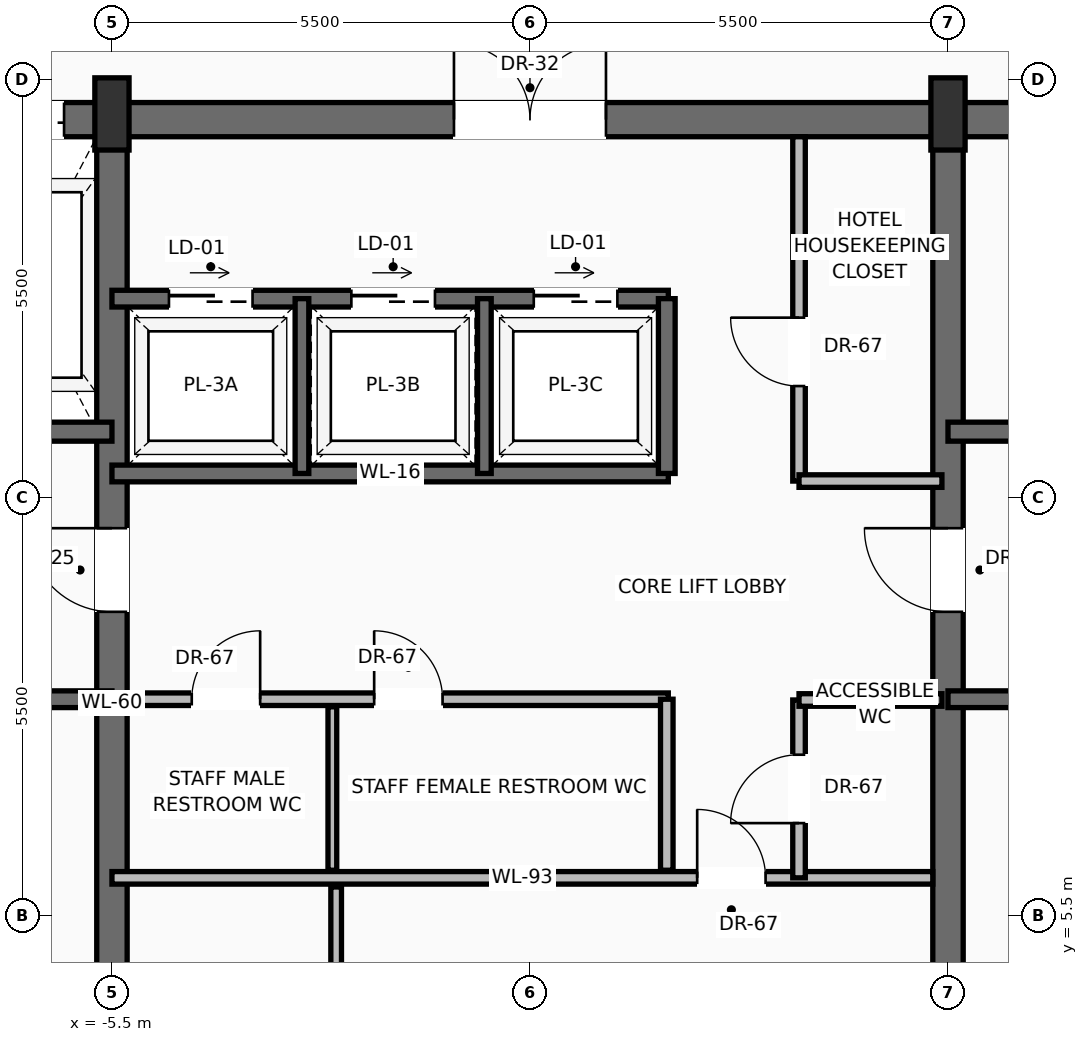
"""IFC4 building model, lengths in metres.
Left out: names, types, materials, properties, quantities, classifications, styles, units other than length and angle.
Written with IfcOpenShell. Run it as: python <this file> out.ifc"""

import sys

from ifc_helpers import new_model, si_unit, direction, frame, frame_2d, origin, origin_2d, place, context, subcontext, project, spatial, rectangle, extrude, source, transform, mapped, element, fill, save


model = new_model("IFC4")
c1 = context("Model", 3, precision=1e-05, world=origin(), true_north=direction((0.0, 1.0)))
c2 = subcontext(c1, "Body", "Model", "MODEL_VIEW")
j1 = project(units=[si_unit("LENGTHUNIT", "METRE"), si_unit("PLANEANGLEUNIT", "RADIAN")], contexts=[c1])
p1 = place(None, origin())
s1 = spatial("IfcSite", under=j1, at=p1, CompositionType="ELEMENT")
p2 = place(p1, origin())
s2 = spatial("IfcBuilding", under=s1, at=p2, CompositionType="ELEMENT")
p3 = place(p2, frame((0.0, 0.0, 262.65)))
s3 = spatial("IfcBuildingStorey", under=s2, at=p3, CompositionType="ELEMENT", Elevation=262.65)
p4 = place(p3, frame((-10.6, 15.975, 0.0), z_axis=(0.0, 0.0, 1.0), x_axis=(1.0, 0.0, 0.0)))
e1 = element("IfcWall", 1, at=p4, inside=s3, PredefinedType="SHEAR", context=c2, shape_type="SweptSolid", body=[
    extrude(rectangle(XDim=21.2, YDim=0.45, at=frame_2d((10.6, 0.0))), origin(), (0.0, 0.0, 1.0), 3.24),
])
p5 = place(p4, frame((3.17, 0.0, 0.0)))
e2 = element("IfcOpeningElement", 2, at=p5, cuts=e1, PredefinedType="OPENING", context=c2, shape_type="SweptSolid", body=[
    extrude(rectangle(XDim=1.3, YDim=2.3, at=frame_2d((0.65, 1.15))), frame((0.0, 0.235, 0.0), z_axis=(0.0, -1.0, 0.0), x_axis=(1.0, 0.0, 0.0)), (0.0, 0.0, 1.0), 0.47),
])
p6 = place(p4, frame((9.6, 0.0, 0.0)))
e3 = element("IfcOpeningElement", 3, at=p6, cuts=e1, PredefinedType="OPENING", context=c2, shape_type="SweptSolid", body=[
    extrude(rectangle(XDim=2.0, YDim=2.4, at=frame_2d((1.0, 1.2))), frame((0.0, 0.235, 0.0), z_axis=(0.0, -1.0, 0.0), x_axis=(1.0, 0.0, 0.0)), (0.0, 0.0, 1.0), 0.47),
])
p7 = place(p3, frame((-5.5, 0.625, 0.0), z_axis=(0.0, 0.0, 1.0), x_axis=(0.0, 1.0, 0.0)))
e4 = element("IfcWall", 4, at=p7, inside=s3, PredefinedType="SHEAR", context=c2, shape_type="SweptSolid", body=[
    extrude(rectangle(XDim=15.35, YDim=0.4, at=frame_2d((7.675, 0.0))), origin(), (0.0, 0.0, 1.0), 3.24),
])
p8 = place(p7, frame((8.875, 0.0, 0.0)))
e5 = element("IfcOpeningElement", 5, at=p8, cuts=e4, PredefinedType="OPENING", context=c2, shape_type="SweptSolid", body=[
    extrude(rectangle(XDim=1.1, YDim=2.2, at=frame_2d((0.55, 1.1))), frame((0.0, 0.21, 0.0), z_axis=(0.0, -1.0, 0.0), x_axis=(1.0, 0.0, 0.0)), (0.0, 0.0, 1.0), 0.42),
])
p9 = place(p3, frame((5.5, 0.625, 0.0), z_axis=(0.0, 0.0, 1.0), x_axis=(0.0, 1.0, 0.0)))
e6 = element("IfcWall", 6, at=p9, inside=s3, PredefinedType="SHEAR", context=c2, shape_type="SweptSolid", body=[
    extrude(rectangle(XDim=15.35, YDim=0.4, at=frame_2d((7.675, 0.0))), origin(), (0.0, 0.0, 1.0), 3.24),
])
p10 = place(p9, frame((8.875, 0.0, 0.0)))
e7 = element("IfcOpeningElement", 7, at=p10, cuts=e6, PredefinedType="OPENING", context=c2, shape_type="SweptSolid", body=[
    extrude(rectangle(XDim=1.1, YDim=2.2, at=frame_2d((0.55, 1.1))), frame((0.0, 0.21, 0.0), z_axis=(0.0, -1.0, 0.0), x_axis=(1.0, 0.0, 0.0)), (0.0, 0.0, 1.0), 0.42),
])
m1 = source(origin(), c2, "Body", "SweptSolid", [
    extrude(rectangle(XDim=0.45, YDim=0.95, at=origin_2d()), origin(), (0.0, 0.0, 1.0), 3.45),
])
for number, where, z_axis, x_axis in (
    (8, (-5.5, 16.05, 0.0), (0.0, 0.0, 1.0), (1.0, 0.0, 0.0)),
    (9, (5.5, 16.05, 0.0), (0.0, 0.0, 1.0), (1.0, 0.0, 0.0)),
):
    element("IfcColumn", number, at=place(p3, frame(where, z_axis=z_axis, x_axis=x_axis)), inside=s3, PredefinedType="PILASTER", context=c2, shape_type="MappedRepresentation", body=[
        mapped(m1, transform((0.0, 0.0, 0.0), scale=1.0)),
    ])
p11 = place(p3, frame((-5.5, 8.35, 0.0), z_axis=(0.0, 0.0, 1.0), x_axis=(-1.0, 0.0, 0.0)))
e10 = element("IfcWall", 10, at=p11, inside=s3, PredefinedType="SOLIDWALL", context=c2, shape_type="SweptSolid", body=[
    extrude(rectangle(XDim=4.65, YDim=0.22, at=frame_2d((2.325, 0.0))), origin(), (0.0, 0.0, 1.0), 3.24),
])
p12 = place(p11, frame((2.5, 0.0, 0.0)))
e11 = element("IfcOpeningElement", 11, at=p12, cuts=e10, PredefinedType="OPENING", context=c2, shape_type="SweptSolid", body=[
    extrude(rectangle(XDim=1.15, YDim=2.2, at=frame_2d((0.575, 1.1))), frame((0.0, 0.12, 0.0), z_axis=(0.0, -1.0, 0.0), x_axis=(1.0, 0.0, 0.0)), (0.0, 0.0, 1.0), 0.24),
])
p13 = place(p3, frame((-5.5, 11.87, 0.0), z_axis=(0.0, 0.0, 1.0), x_axis=(-1.0, 0.0, 0.0)))
e12 = element("IfcWall", 12, at=p13, inside=s3, PredefinedType="SOLIDWALL", context=c2, shape_type="SweptSolid", body=[
    extrude(rectangle(XDim=4.65, YDim=0.25, at=frame_2d((2.325, 0.0))), origin(), (0.0, 0.0, 1.0), 3.24),
])
p14 = place(p13, frame((2.95, 0.0, 0.0)))
e13 = element("IfcOpeningElement", 13, at=p14, cuts=e12, PredefinedType="OPENING", context=c2, shape_type="SweptSolid", body=[
    extrude(rectangle(XDim=1.2, YDim=2.25, at=frame_2d((0.6, 1.125))), frame((0.0, 0.135, 0.0), z_axis=(0.0, -1.0, 0.0), x_axis=(1.0, 0.0, 0.0)), (0.0, 0.0, 1.0), 0.27),
])
p15 = place(p3, frame((10.15, 8.35, 0.0), z_axis=(0.0, 0.0, 1.0), x_axis=(-1.0, 0.0, 0.0)))
e14 = element("IfcWall", 14, at=p15, inside=s3, PredefinedType="SOLIDWALL", context=c2, shape_type="SweptSolid", body=[
    extrude(rectangle(XDim=4.65, YDim=0.22, at=frame_2d((2.325, 0.0))), origin(), (0.0, 0.0, 1.0), 3.24),
])
p16 = place(p15, frame((1.0, 0.0, 0.0)))
e15 = element("IfcOpeningElement", 15, at=p16, cuts=e14, PredefinedType="OPENING", context=c2, shape_type="SweptSolid", body=[
    extrude(rectangle(XDim=1.15, YDim=2.2, at=frame_2d((0.575, 1.1))), frame((0.0, 0.12, 0.0), z_axis=(0.0, -1.0, 0.0), x_axis=(1.0, 0.0, 0.0)), (0.0, 0.0, 1.0), 0.24),
])
p17 = place(p3, frame((10.15, 11.87, 0.0), z_axis=(0.0, 0.0, 1.0), x_axis=(-1.0, 0.0, 0.0)))
e16 = element("IfcWall", 16, at=p17, inside=s3, PredefinedType="SOLIDWALL", context=c2, shape_type="SweptSolid", body=[
    extrude(rectangle(XDim=4.65, YDim=0.25, at=frame_2d((2.325, 0.0))), origin(), (0.0, 0.0, 1.0), 3.24),
])
p18 = place(p17, frame((0.5, 0.0, 0.0)))
e17 = element("IfcOpeningElement", 17, at=p18, cuts=e16, PredefinedType="OPENING", context=c2, shape_type="SweptSolid", body=[
    extrude(rectangle(XDim=1.2, YDim=2.25, at=frame_2d((0.6, 1.125))), frame((0.0, 0.135, 0.0), z_axis=(0.0, -1.0, 0.0), x_axis=(1.0, 0.0, 0.0)), (0.0, 0.0, 1.0), 0.27),
])
p19 = place(p3, frame((-5.5, 6.0, 0.0), z_axis=(0.0, 0.0, 1.0), x_axis=(1.0, 0.0, 0.0)))
e18 = element("IfcWall", 18, at=p19, inside=s3, PredefinedType="PARTITIONING", context=c2, shape_type="SweptSolid", body=[
    extrude(rectangle(XDim=10.8, YDim=0.165, at=frame_2d((5.4, 0.0))), origin(), (0.0, 0.0, 1.0), 3.232),
])
p20 = place(p19, frame((7.7, 0.0, 0.0)))
e19 = element("IfcOpeningElement", 19, at=p20, cuts=e18, PredefinedType="OPENING", context=c2, shape_type="SweptSolid", body=[
    extrude(rectangle(XDim=0.9, YDim=2.1, at=frame_2d((0.45, 1.05))), frame((0.0, 0.093, 0.0), z_axis=(0.0, -1.0, 0.0), x_axis=(1.0, 0.0, 0.0)), (0.0, 0.0, 1.0), 0.185),
])
p21 = place(p3, frame((-2.55, 0.85, 0.0), z_axis=(0.0, 0.0, 1.0), x_axis=(0.0, 1.0, 0.0)))
e20 = element("IfcWall", 20, at=p21, inside=s3, PredefinedType="PARTITIONING", context=c2, shape_type="SweptSolid", body=[
    extrude(rectangle(XDim=5.03, YDim=0.14, at=frame_2d((2.515, 0.0))), origin(), (0.0, 0.0, 1.0), 3.232),
])
p22 = place(p21, frame((2.1, 0.0, 0.0)))
e21 = element("IfcOpeningElement", 21, at=p22, cuts=e20, PredefinedType="OPENING", context=c2, shape_type="SweptSolid", body=[
    extrude(rectangle(XDim=0.9, YDim=2.1, at=frame_2d((0.45, 1.05))), frame((0.0, 0.08, 0.0), z_axis=(0.0, -1.0, 0.0), x_axis=(1.0, 0.0, 0.0)), (0.0, 0.0, 1.0), 0.16),
])
p23 = place(p3, frame((3.54, 6.0, 0.0), z_axis=(0.0, 0.0, 1.0), x_axis=(0.0, 1.0, 0.0)))
e22 = element("IfcWall", 22, at=p23, inside=s3, PredefinedType="PARTITIONING", context=c2, shape_type="SweptSolid", body=[
    extrude(rectangle(XDim=2.34, YDim=0.165, at=frame_2d((1.17, 0.0))), origin(), (0.0, 0.0, 1.0), 3.232),
])
p24 = place(p23, frame((0.72, 0.0, 0.0)))
e23 = element("IfcOpeningElement", 23, at=p24, cuts=e22, PredefinedType="OPENING", context=c2, shape_type="SweptSolid", body=[
    extrude(rectangle(XDim=0.9, YDim=2.1, at=frame_2d((0.45, 1.05))), frame((0.0, 0.093, 0.0), z_axis=(0.0, -1.0, 0.0), x_axis=(1.0, 0.0, 0.0)), (0.0, 0.0, 1.0), 0.185),
])
p25 = place(p3, frame((3.54, 8.34, 0.0), z_axis=(0.0, 0.0, 1.0), x_axis=(1.0, 0.0, 0.0)))
e24 = element("IfcWall", 24, at=p25, inside=s3, PredefinedType="PARTITIONING", context=c2, shape_type="SweptSolid", body=[
    extrude(rectangle(XDim=1.88, YDim=0.165, at=frame_2d((0.94, 0.0))), origin(), (0.0, 0.0, 1.0), 3.232),
])
p26 = place(p3, frame((-5.3, 8.35, 0.0), z_axis=(0.0, 0.0, 1.0), x_axis=(1.0, 0.0, 0.0)))
e25 = element("IfcWall", 25, at=p26, inside=s3, PredefinedType="PARTITIONING", context=c2, shape_type="SweptSolid", body=[
    extrude(rectangle(XDim=7.12, YDim=0.165, at=frame_2d((3.56, 0.0))), origin(), (0.0, 0.0, 1.0), 3.232),
])
p27 = place(p26, frame((0.85, 0.0, 0.0)))
e26 = element("IfcOpeningElement", 26, at=p27, cuts=e25, PredefinedType="OPENING", context=c2, shape_type="SweptSolid", body=[
    extrude(rectangle(XDim=0.9, YDim=2.1, at=frame_2d((0.45, 1.05))), frame((0.0, 0.093, 0.0), z_axis=(0.0, -1.0, 0.0), x_axis=(1.0, 0.0, 0.0)), (0.0, 0.0, 1.0), 0.185),
])
p28 = place(p26, frame((3.25, 0.0, 0.0)))
e27 = element("IfcOpeningElement", 27, at=p28, cuts=e25, PredefinedType="OPENING", context=c2, shape_type="SweptSolid", body=[
    extrude(rectangle(XDim=0.9, YDim=2.1, at=frame_2d((0.45, 1.05))), frame((0.0, 0.093, 0.0), z_axis=(0.0, -1.0, 0.0), x_axis=(1.0, 0.0, 0.0)), (0.0, 0.0, 1.0), 0.185),
])
p29 = place(p3, frame((1.8, 6.1, 0.0), z_axis=(0.0, 0.0, 1.0), x_axis=(0.0, 1.0, 0.0)))
e28 = element("IfcWall", 28, at=p29, inside=s3, PredefinedType="PARTITIONING", context=c2, shape_type="SweptSolid", body=[
    extrude(rectangle(XDim=2.25, YDim=0.165, at=frame_2d((1.125, 0.0))), origin(), (0.0, 0.0, 1.0), 3.232),
])
p30 = place(p3, frame((-2.6, 6.1, 0.0), z_axis=(0.0, 0.0, 1.0), x_axis=(0.0, 1.0, 0.0)))
e29 = element("IfcWall", 29, at=p30, inside=s3, PredefinedType="PARTITIONING", context=c2, shape_type="SweptSolid", body=[
    extrude(rectangle(XDim=2.15, YDim=0.115, at=frame_2d((1.075, 0.0))), origin(), (0.0, 0.0, 1.0), 3.232),
])
p31 = place(p3, frame((-5.5, 11.32, 0.0), z_axis=(0.0, 0.0, 1.0), x_axis=(1.0, 0.0, 0.0)))
e30 = element("IfcWall", 30, at=p31, inside=s3, PredefinedType="SOLIDWALL", context=c2, shape_type="SweptSolid", body=[
    extrude(rectangle(XDim=7.32, YDim=0.22, at=frame_2d((3.66, 0.0))), origin(), (0.0, 0.0, 1.0), 3.24),
])
p32 = place(p3, frame((-5.5, 13.62, 0.0), z_axis=(0.0, 0.0, 1.0), x_axis=(1.0, 0.0, 0.0)))
e31 = element("IfcWall", 31, at=p32, inside=s3, PredefinedType="SOLIDWALL", context=c2, shape_type="SweptSolid", body=[
    extrude(rectangle(XDim=7.32, YDim=0.22, at=frame_2d((3.66, 0.0))), origin(), (0.0, 0.0, 1.0), 3.24),
])
p33 = place(p32, frame((0.75, 0.0, 0.0)))
e32 = element("IfcOpeningElement", 32, at=p33, cuts=e31, PredefinedType="OPENING", context=c2, shape_type="SweptSolid", body=[
    extrude(rectangle(XDim=1.1, YDim=2.2, at=frame_2d((0.55, 1.1))), frame((0.0, 0.12, 0.0), z_axis=(0.0, -1.0, 0.0), x_axis=(1.0, 0.0, 0.0)), (0.0, 0.0, 1.0), 0.24),
])
p34 = place(p32, frame((3.15, 0.0, 0.0)))
e33 = element("IfcOpeningElement", 33, at=p34, cuts=e31, PredefinedType="OPENING", context=c2, shape_type="SweptSolid", body=[
    extrude(rectangle(XDim=1.1, YDim=2.2, at=frame_2d((0.55, 1.1))), frame((0.0, 0.12, 0.0), z_axis=(0.0, -1.0, 0.0), x_axis=(1.0, 0.0, 0.0)), (0.0, 0.0, 1.0), 0.24),
])
p35 = place(p32, frame((5.55, 0.0, 0.0)))
e34 = element("IfcOpeningElement", 34, at=p35, cuts=e31, PredefinedType="OPENING", context=c2, shape_type="SweptSolid", body=[
    extrude(rectangle(XDim=1.1, YDim=2.2, at=frame_2d((0.55, 1.1))), frame((0.0, 0.12, 0.0), z_axis=(0.0, -1.0, 0.0), x_axis=(1.0, 0.0, 0.0)), (0.0, 0.0, 1.0), 0.24),
])
p36 = place(p3, frame((1.8, 11.32, 0.0), z_axis=(0.0, 0.0, 1.0), x_axis=(0.0, 1.0, 0.0)))
e35 = element("IfcWall", 35, at=p36, inside=s3, PredefinedType="SOLIDWALL", context=c2, shape_type="SweptSolid", body=[
    extrude(rectangle(XDim=2.3, YDim=0.22, at=frame_2d((1.15, 0.0))), origin(), (0.0, 0.0, 1.0), 3.24),
])
for number, where, z_axis, x_axis in (
    (36, (-3.0, 11.32, 0.0), (0.0, 0.0, 1.0), (0.0, 1.0, 0.0)),
    (37, (-0.6, 11.32, 0.0), (0.0, 0.0, 1.0), (0.0, 1.0, 0.0)),
):
    element("IfcWall", number, at=place(p3, frame(where, z_axis=z_axis, x_axis=x_axis)), inside=s3, PredefinedType="SOLIDWALL", context=c2, shape_type="SweptSolid", body=[
        extrude(rectangle(XDim=2.3, YDim=0.18, at=frame_2d((1.15, 0.0))), origin(), (0.0, 0.0, 1.0), 3.24),
    ])
p37 = place(p3, frame((3.54, 11.22, 0.0), z_axis=(0.0, 0.0, 1.0), x_axis=(0.0, 1.0, 0.0)))
e38 = element("IfcWall", 38, at=p37, inside=s3, PredefinedType="PARTITIONING", context=c2, shape_type="SweptSolid", body=[
    extrude(rectangle(XDim=4.53, YDim=0.165, at=frame_2d((2.265, 0.0))), origin(), (0.0, 0.0, 1.0), 3.232),
])
p38 = place(p37, frame((1.25, 0.0, 0.0)))
e39 = element("IfcOpeningElement", 39, at=p38, cuts=e38, PredefinedType="OPENING", context=c2, shape_type="SweptSolid", body=[
    extrude(rectangle(XDim=0.9, YDim=2.1, at=frame_2d((0.45, 1.05))), frame((0.0, 0.093, 0.0), z_axis=(0.0, -1.0, 0.0), x_axis=(1.0, 0.0, 0.0)), (0.0, 0.0, 1.0), 0.185),
])
p39 = place(p3, frame((3.54, 11.22, 0.0), z_axis=(0.0, 0.0, 1.0), x_axis=(1.0, 0.0, 0.0)))
e40 = element("IfcWall", 40, at=p39, inside=s3, PredefinedType="PARTITIONING", context=c2, shape_type="SweptSolid", body=[
    extrude(rectangle(XDim=1.88, YDim=0.165, at=frame_2d((0.94, 0.0))), origin(), (0.0, 0.0, 1.0), 3.232),
])
m2 = source(origin(), c2, "Body", "SweptSolid", [
    extrude(rectangle(XDim=1.1, YDim=2.2, at=frame_2d((0.55, 1.1))), frame((0.0, 0.025, 0.0), z_axis=(0.0, -1.0, 0.0), x_axis=(1.0, 0.0, 0.0)), (0.0, 0.0, 1.0), 0.05),
])
p40 = place(p8, origin())
e41 = element("IfcDoor", 41, at=p40, inside=s3, OperationType="SINGLE_SWING_RIGHT", PredefinedType="DOOR", context=c2, shape_type="MappedRepresentation", body=[
    mapped(m2, transform((0.0, 0.0, 0.0), scale=1.0)),
])
fill(e5, e41)
m3 = source(origin(), c2, "Body", "SweptSolid", [
    extrude(rectangle(XDim=1.3, YDim=2.3, at=frame_2d((0.65, 1.15))), frame((0.0, 0.025, 0.0), z_axis=(0.0, -1.0, 0.0), x_axis=(1.0, 0.0, 0.0)), (0.0, 0.0, 1.0), 0.05),
])
p41 = place(p5, origin())
e42 = element("IfcDoor", 42, at=p41, inside=s3, OperationType="SLIDING_TO_RIGHT", PredefinedType="DOOR", context=c2, shape_type="MappedRepresentation", body=[
    mapped(m3, transform((0.0, 0.0, 0.0), scale=1.0)),
])
fill(e2, e42)
p42 = place(p10, origin())
e43 = element("IfcDoor", 43, at=p42, inside=s3, OperationType="SINGLE_SWING_RIGHT", PredefinedType="DOOR", context=c2, shape_type="MappedRepresentation", body=[
    mapped(m2, transform((0.0, 0.0, 0.0), scale=1.0)),
])
fill(e7, e43)
m4 = source(origin(), c2, "Body", "SweptSolid", [
    extrude(rectangle(XDim=2.0, YDim=2.4, at=frame_2d((1.0, 1.2))), frame((0.0, 0.025, 0.0), z_axis=(0.0, -1.0, 0.0), x_axis=(1.0, 0.0, 0.0)), (0.0, 0.0, 1.0), 0.05),
])
p43 = place(p6, origin())
e44 = element("IfcDoor", 44, at=p43, inside=s3, OperationType="DOUBLE_DOOR_SINGLE_SWING", PredefinedType="DOOR", context=c2, shape_type="MappedRepresentation", body=[
    mapped(m4, transform((0.0, 0.0, 0.0), scale=1.0)),
])
fill(e3, e44)
m5 = source(origin(), c2, "Body", "SweptSolid", [
    extrude(rectangle(XDim=0.9, YDim=2.1, at=frame_2d((0.45, 1.05))), frame((0.0, 0.025, 0.0), z_axis=(0.0, -1.0, 0.0), x_axis=(1.0, 0.0, 0.0)), (0.0, 0.0, 1.0), 0.05),
])
p44 = place(p20, origin())
e45 = element("IfcDoor", 45, at=p44, inside=s3, OperationType="SINGLE_SWING_LEFT", PredefinedType="DOOR", context=c2, shape_type="MappedRepresentation", body=[
    mapped(m5, transform((0.0, 0.0, 0.0), scale=1.0)),
])
fill(e19, e45)
p45 = place(p24, origin())
e46 = element("IfcDoor", 46, at=p45, inside=s3, OperationType="SINGLE_SWING_LEFT", PredefinedType="DOOR", context=c2, shape_type="MappedRepresentation", body=[
    mapped(m5, transform((0.0, 0.0, 0.0), scale=1.0)),
])
fill(e23, e46)
p46 = place(p27, origin())
e47 = element("IfcDoor", 47, at=p46, inside=s3, OperationType="SINGLE_SWING_RIGHT", PredefinedType="DOOR", context=c2, shape_type="MappedRepresentation", body=[
    mapped(m5, transform((0.0, 0.0, 0.0), scale=1.0)),
])
fill(e26, e47)
p47 = place(p28, origin())
e48 = element("IfcDoor", 48, at=p47, inside=s3, OperationType="SINGLE_SWING_LEFT", PredefinedType="DOOR", context=c2, shape_type="MappedRepresentation", body=[
    mapped(m5, transform((0.0, 0.0, 0.0), scale=1.0)),
])
fill(e27, e48)
m6 = source(origin(), c2, "Body", "SweptSolid", [
    extrude(rectangle(XDim=1.1, YDim=2.2, at=frame_2d((0.55, 1.1))), frame((0.0, 0.025, 0.0), z_axis=(0.0, -1.0, 0.0), x_axis=(1.0, 0.0, 0.0)), (0.0, 0.0, 1.0), 0.05),
])
p48 = place(p33, origin())
e49 = element("IfcDoor", 49, at=p48, inside=s3, OperationType="SLIDING_TO_RIGHT", PredefinedType="DOOR", context=c2, shape_type="MappedRepresentation", body=[
    mapped(m6, transform((0.0, 0.0, 0.0), scale=1.0)),
])
fill(e32, e49)
p49 = place(p34, origin())
e50 = element("IfcDoor", 50, at=p49, inside=s3, OperationType="SLIDING_TO_RIGHT", PredefinedType="DOOR", context=c2, shape_type="MappedRepresentation", body=[
    mapped(m6, transform((0.0, 0.0, 0.0), scale=1.0)),
])
fill(e33, e50)
p50 = place(p35, origin())
e51 = element("IfcDoor", 51, at=p50, inside=s3, OperationType="SLIDING_TO_RIGHT", PredefinedType="DOOR", context=c2, shape_type="MappedRepresentation", body=[
    mapped(m6, transform((0.0, 0.0, 0.0), scale=1.0)),
])
fill(e34, e51)
p51 = place(p38, origin())
e52 = element("IfcDoor", 52, at=p51, inside=s3, OperationType="SINGLE_SWING_RIGHT", PredefinedType="DOOR", context=c2, shape_type="MappedRepresentation", body=[
    mapped(m5, transform((0.0, 0.0, 0.0), scale=1.0)),
])
fill(e39, e52)
save(model, sys.argv[1])
